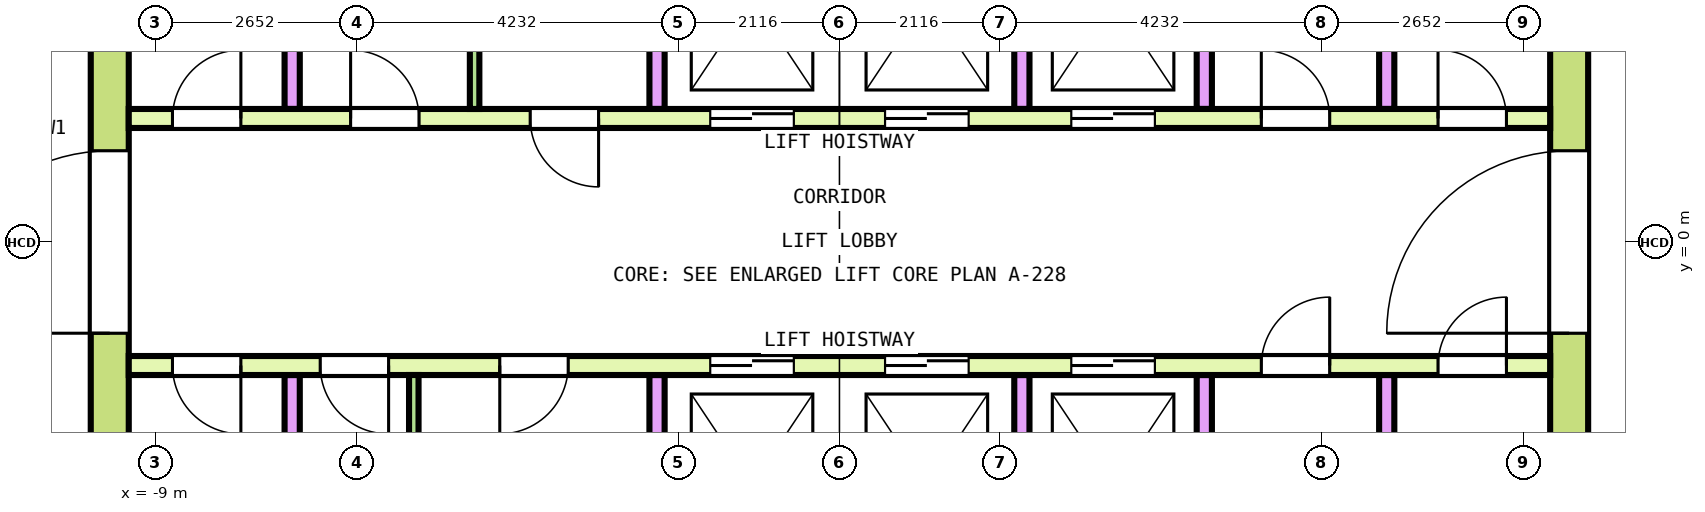
"""IFC4 building model, lengths in metres.
Left out: names, types, materials, properties, quantities, classifications, styles, units other than length and angle.
Written with IfcOpenShell. Run it as: python <this file> out.ifc"""

import sys

from ifc_helpers import new_model, si_unit, direction, frame, frame_2d, origin, place, context, subcontext, project, spatial, rectangle, extrude, element, fill, save


model = new_model("IFC4")
c1 = context("Model", 3, precision=1e-05, world=origin(), true_north=direction((0.0, 1.0)))
c2 = subcontext(c1, "Body", "Model", "MODEL_VIEW")
j1 = project(units=[si_unit("LENGTHUNIT", "METRE"), si_unit("PLANEANGLEUNIT", "RADIAN")], contexts=[c1])
p1 = place(None, origin())
s1 = spatial("IfcSite", under=j1, at=p1, CompositionType="ELEMENT")
p2 = place(p1, origin())
s2 = spatial("IfcBuilding", under=s1, at=p2, CompositionType="ELEMENT")
p3 = place(p2, frame((0.0, 0.0, 263.0)))
s3 = spatial("IfcBuildingStorey", under=s2, at=p3, CompositionType="ELEMENT", Elevation=263.0)
p4 = place(p3, frame((-9.6, -7.85, 0.0), z_axis=(0.0, 0.0, 1.0), x_axis=(0.0, 1.0, 0.0)))
e1 = element("IfcWall", 1, at=p4, inside=s3, PredefinedType="SHEAR", context=c2, shape_type="SweptSolid", body=[
    extrude(rectangle(XDim=15.7, YDim=0.5, at=frame_2d((7.85, 0.0))), origin(), (0.0, 0.0, 1.0), 3.7),
])
p5 = place(p4, frame((6.65, 0.0, 0.0)))
e2 = element("IfcOpeningElement", 2, at=p5, cuts=e1, PredefinedType="OPENING", context=c2, shape_type="SweptSolid", body=[
    extrude(rectangle(XDim=2.4, YDim=2.1, at=frame_2d((1.2, 1.05))), frame((0.0, 0.26, 0.0), z_axis=(0.0, -1.0, 0.0), x_axis=(1.0, 0.0, 0.0)), (0.0, 0.0, 1.0), 0.52),
])
p6 = place(p4, frame((13.55, 0.0, 0.0)))
e3 = element("IfcOpeningElement", 3, at=p6, cuts=e1, PredefinedType="OPENING", context=c2, shape_type="SweptSolid", body=[
    extrude(rectangle(XDim=1.2, YDim=2.1, at=frame_2d((0.6, 1.05))), frame((0.0, 0.26, 0.0), z_axis=(0.0, -1.0, 0.0), x_axis=(1.0, 0.0, 0.0)), (0.0, 0.0, 1.0), 0.52),
])
p7 = place(p4, frame((0.95, 0.0, 0.0)))
e4 = element("IfcOpeningElement", 4, at=p7, cuts=e1, PredefinedType="OPENING", context=c2, shape_type="SweptSolid", body=[
    extrude(rectangle(XDim=1.2, YDim=2.1, at=frame_2d((0.6, 1.05))), frame((0.0, 0.26, 0.0), z_axis=(0.0, -1.0, 0.0), x_axis=(1.0, 0.0, 0.0)), (0.0, 0.0, 1.0), 0.52),
])
p8 = place(p3, frame((9.6, -7.85, 0.0), z_axis=(0.0, 0.0, 1.0), x_axis=(0.0, 1.0, 0.0)))
e5 = element("IfcWall", 5, at=p8, inside=s3, PredefinedType="SHEAR", context=c2, shape_type="SweptSolid", body=[
    extrude(rectangle(XDim=15.7, YDim=0.5, at=frame_2d((7.85, 0.0))), origin(), (0.0, 0.0, 1.0), 3.7),
])
p9 = place(p8, frame((6.65, 0.0, 0.0)))
e6 = element("IfcOpeningElement", 6, at=p9, cuts=e5, PredefinedType="OPENING", context=c2, shape_type="SweptSolid", body=[
    extrude(rectangle(XDim=2.4, YDim=2.1, at=frame_2d((1.2, 1.05))), frame((0.0, 0.26, 0.0), z_axis=(0.0, -1.0, 0.0), x_axis=(1.0, 0.0, 0.0)), (0.0, 0.0, 1.0), 0.52),
])
p10 = place(p8, frame((13.55, 0.0, 0.0)))
e7 = element("IfcOpeningElement", 7, at=p10, cuts=e5, PredefinedType="OPENING", context=c2, shape_type="SweptSolid", body=[
    extrude(rectangle(XDim=1.2, YDim=2.1, at=frame_2d((0.6, 1.05))), frame((0.0, 0.26, 0.0), z_axis=(0.0, -1.0, 0.0), x_axis=(1.0, 0.0, 0.0)), (0.0, 0.0, 1.0), 0.52),
])
p11 = place(p8, frame((1.05, 0.0, 0.0)))
e8 = element("IfcOpeningElement", 8, at=p11, cuts=e5, PredefinedType="OPENING", context=c2, shape_type="SweptSolid", body=[
    extrude(rectangle(XDim=1.0, YDim=2.1, at=frame_2d((0.5, 1.05))), frame((0.0, 0.26, 0.0), z_axis=(0.0, -1.0, 0.0), x_axis=(1.0, 0.0, 0.0)), (0.0, 0.0, 1.0), 0.52),
])
p12 = place(p3, frame((-9.35, 1.625, 0.0), z_axis=(0.0, 0.0, 1.0), x_axis=(1.0, 0.0, 0.0)))
e9 = element("IfcWall", 9, at=p12, inside=s3, PredefinedType="SOLIDWALL", context=c2, shape_type="SweptSolid", body=[
    extrude(rectangle(XDim=18.7, YDim=0.25, at=frame_2d((9.35, 0.0))), origin(), (0.0, 0.0, 1.0), 3.7),
])
p13 = place(p12, frame((7.65, 0.0, 0.0)))
e10 = element("IfcOpeningElement", 10, at=p13, cuts=e9, PredefinedType="OPENING", context=c2, shape_type="SweptSolid", body=[
    extrude(rectangle(XDim=1.1, YDim=2.1, at=frame_2d((0.55, 1.05))), frame((0.0, 0.135, 0.0), z_axis=(0.0, -1.0, 0.0), x_axis=(1.0, 0.0, 0.0)), (0.0, 0.0, 1.0), 0.27),
])
p14 = place(p12, frame((9.95, 0.0, 0.0)))
e11 = element("IfcOpeningElement", 11, at=p14, cuts=e9, PredefinedType="OPENING", context=c2, shape_type="SweptSolid", body=[
    extrude(rectangle(XDim=1.1, YDim=2.1, at=frame_2d((0.55, 1.05))), frame((0.0, 0.135, 0.0), z_axis=(0.0, -1.0, 0.0), x_axis=(1.0, 0.0, 0.0)), (0.0, 0.0, 1.0), 0.27),
])
p15 = place(p12, frame((12.4, 0.0, 0.0)))
e12 = element("IfcOpeningElement", 12, at=p15, cuts=e9, PredefinedType="OPENING", context=c2, shape_type="SweptSolid", body=[
    extrude(rectangle(XDim=1.1, YDim=2.1, at=frame_2d((0.55, 1.05))), frame((0.0, 0.135, 0.0), z_axis=(0.0, -1.0, 0.0), x_axis=(1.0, 0.0, 0.0)), (0.0, 0.0, 1.0), 0.27),
])
p16 = place(p12, frame((0.575, 0.0, 0.0)))
e13 = element("IfcOpeningElement", 13, at=p16, cuts=e9, PredefinedType="OPENING", context=c2, shape_type="SweptSolid", body=[
    extrude(rectangle(XDim=0.9, YDim=2.1, at=frame_2d((0.45, 1.05))), frame((0.0, 0.135, 0.0), z_axis=(0.0, -1.0, 0.0), x_axis=(1.0, 0.0, 0.0)), (0.0, 0.0, 1.0), 0.27),
])
p17 = place(p12, frame((2.919, 0.0, 0.0)))
e14 = element("IfcOpeningElement", 14, at=p17, cuts=e9, PredefinedType="OPENING", context=c2, shape_type="SweptSolid", body=[
    extrude(rectangle(XDim=0.9, YDim=2.1, at=frame_2d((0.45, 1.05))), frame((0.0, 0.135, 0.0), z_axis=(0.0, -1.0, 0.0), x_axis=(1.0, 0.0, 0.0)), (0.0, 0.0, 1.0), 0.27),
])
p18 = place(p12, frame((5.281, 0.0, 0.0)))
e15 = element("IfcOpeningElement", 15, at=p18, cuts=e9, PredefinedType="OPENING", context=c2, shape_type="SweptSolid", body=[
    extrude(rectangle(XDim=0.9, YDim=2.1, at=frame_2d((0.45, 1.05))), frame((0.0, 0.135, 0.0), z_axis=(0.0, -1.0, 0.0), x_axis=(1.0, 0.0, 0.0)), (0.0, 0.0, 1.0), 0.27),
])
p19 = place(p12, frame((14.9, 0.0, 0.0)))
e16 = element("IfcOpeningElement", 16, at=p19, cuts=e9, PredefinedType="OPENING", context=c2, shape_type="SweptSolid", body=[
    extrude(rectangle(XDim=0.9, YDim=2.1, at=frame_2d((0.45, 1.05))), frame((0.0, 0.135, 0.0), z_axis=(0.0, -1.0, 0.0), x_axis=(1.0, 0.0, 0.0)), (0.0, 0.0, 1.0), 0.27),
])
p20 = place(p12, frame((17.225, 0.0, 0.0)))
e17 = element("IfcOpeningElement", 17, at=p20, cuts=e9, PredefinedType="OPENING", context=c2, shape_type="SweptSolid", body=[
    extrude(rectangle(XDim=0.9, YDim=2.1, at=frame_2d((0.45, 1.05))), frame((0.0, 0.135, 0.0), z_axis=(0.0, -1.0, 0.0), x_axis=(1.0, 0.0, 0.0)), (0.0, 0.0, 1.0), 0.27),
])
for number, where, z_axis, x_axis in (
    (18, (-7.2, 1.75, 0.0), (0.0, 0.0, 1.0), (0.0, 1.0, 0.0)),
    (19, (-2.4, 1.75, 0.0), (0.0, 0.0, 1.0), (0.0, 1.0, 0.0)),
    (20, (2.4, 1.75, 0.0), (0.0, 0.0, 1.0), (0.0, 1.0, 0.0)),
    (21, (4.8, 1.75, 0.0), (0.0, 0.0, 1.0), (0.0, 1.0, 0.0)),
    (22, (7.2, 1.75, 0.0), (0.0, 0.0, 1.0), (0.0, 1.0, 0.0)),
):
    element("IfcWall", number, at=place(p3, frame(where, z_axis=z_axis, x_axis=x_axis)), inside=s3, PredefinedType="SOLIDWALL", context=c2, shape_type="SweptSolid", body=[
        extrude(rectangle(XDim=2.9, YDim=0.2, at=frame_2d((1.45, 0.0))), origin(), (0.0, 0.0, 1.0), 3.7),
    ])
p21 = place(p3, frame((-9.35, -1.625, 0.0), z_axis=(0.0, 0.0, 1.0), x_axis=(1.0, 0.0, 0.0)))
e23 = element("IfcWall", 23, at=p21, inside=s3, PredefinedType="SOLIDWALL", context=c2, shape_type="SweptSolid", body=[
    extrude(rectangle(XDim=18.7, YDim=0.25, at=frame_2d((9.35, 0.0))), origin(), (0.0, 0.0, 1.0), 3.7),
])
p22 = place(p21, frame((7.65, 0.0, 0.0)))
e24 = element("IfcOpeningElement", 24, at=p22, cuts=e23, PredefinedType="OPENING", context=c2, shape_type="SweptSolid", body=[
    extrude(rectangle(XDim=1.1, YDim=2.1, at=frame_2d((0.55, 1.05))), frame((0.0, 0.135, 0.0), z_axis=(0.0, -1.0, 0.0), x_axis=(1.0, 0.0, 0.0)), (0.0, 0.0, 1.0), 0.27),
])
p23 = place(p21, frame((9.95, 0.0, 0.0)))
e25 = element("IfcOpeningElement", 25, at=p23, cuts=e23, PredefinedType="OPENING", context=c2, shape_type="SweptSolid", body=[
    extrude(rectangle(XDim=1.1, YDim=2.1, at=frame_2d((0.55, 1.05))), frame((0.0, 0.135, 0.0), z_axis=(0.0, -1.0, 0.0), x_axis=(1.0, 0.0, 0.0)), (0.0, 0.0, 1.0), 0.27),
])
p24 = place(p21, frame((12.4, 0.0, 0.0)))
e26 = element("IfcOpeningElement", 26, at=p24, cuts=e23, PredefinedType="OPENING", context=c2, shape_type="SweptSolid", body=[
    extrude(rectangle(XDim=1.1, YDim=2.1, at=frame_2d((0.55, 1.05))), frame((0.0, 0.135, 0.0), z_axis=(0.0, -1.0, 0.0), x_axis=(1.0, 0.0, 0.0)), (0.0, 0.0, 1.0), 0.27),
])
p25 = place(p21, frame((0.575, 0.0, 0.0)))
e27 = element("IfcOpeningElement", 27, at=p25, cuts=e23, PredefinedType="OPENING", context=c2, shape_type="SweptSolid", body=[
    extrude(rectangle(XDim=0.9, YDim=2.1, at=frame_2d((0.45, 1.05))), frame((0.0, 0.135, 0.0), z_axis=(0.0, -1.0, 0.0), x_axis=(1.0, 0.0, 0.0)), (0.0, 0.0, 1.0), 0.27),
])
p26 = place(p21, frame((2.519, 0.0, 0.0)))
e28 = element("IfcOpeningElement", 28, at=p26, cuts=e23, PredefinedType="OPENING", context=c2, shape_type="SweptSolid", body=[
    extrude(rectangle(XDim=0.9, YDim=2.1, at=frame_2d((0.45, 1.05))), frame((0.0, 0.135, 0.0), z_axis=(0.0, -1.0, 0.0), x_axis=(1.0, 0.0, 0.0)), (0.0, 0.0, 1.0), 0.27),
])
p27 = place(p21, frame((4.881, 0.0, 0.0)))
e29 = element("IfcOpeningElement", 29, at=p27, cuts=e23, PredefinedType="OPENING", context=c2, shape_type="SweptSolid", body=[
    extrude(rectangle(XDim=0.9, YDim=2.1, at=frame_2d((0.45, 1.05))), frame((0.0, 0.135, 0.0), z_axis=(0.0, -1.0, 0.0), x_axis=(1.0, 0.0, 0.0)), (0.0, 0.0, 1.0), 0.27),
])
p28 = place(p21, frame((14.9, 0.0, 0.0)))
e30 = element("IfcOpeningElement", 30, at=p28, cuts=e23, PredefinedType="OPENING", context=c2, shape_type="SweptSolid", body=[
    extrude(rectangle(XDim=0.9, YDim=2.1, at=frame_2d((0.45, 1.05))), frame((0.0, 0.135, 0.0), z_axis=(0.0, -1.0, 0.0), x_axis=(1.0, 0.0, 0.0)), (0.0, 0.0, 1.0), 0.27),
])
p29 = place(p21, frame((17.225, 0.0, 0.0)))
e31 = element("IfcOpeningElement", 31, at=p29, cuts=e23, PredefinedType="OPENING", context=c2, shape_type="SweptSolid", body=[
    extrude(rectangle(XDim=0.9, YDim=2.1, at=frame_2d((0.45, 1.05))), frame((0.0, 0.135, 0.0), z_axis=(0.0, -1.0, 0.0), x_axis=(1.0, 0.0, 0.0)), (0.0, 0.0, 1.0), 0.27),
])
for number, where, z_axis, x_axis in (
    (32, (-7.2, -4.65, 0.0), (0.0, 0.0, 1.0), (0.0, 1.0, 0.0)),
    (33, (-2.4, -4.65, 0.0), (0.0, 0.0, 1.0), (0.0, 1.0, 0.0)),
    (34, (2.4, -4.65, 0.0), (0.0, 0.0, 1.0), (0.0, 1.0, 0.0)),
    (35, (4.8, -4.65, 0.0), (0.0, 0.0, 1.0), (0.0, 1.0, 0.0)),
    (36, (7.2, -4.65, 0.0), (0.0, 0.0, 1.0), (0.0, 1.0, 0.0)),
):
    element("IfcWall", number, at=place(p3, frame(where, z_axis=z_axis, x_axis=x_axis)), inside=s3, PredefinedType="SOLIDWALL", context=c2, shape_type="SweptSolid", body=[
        extrude(rectangle(XDim=2.9, YDim=0.2, at=frame_2d((1.45, 0.0))), origin(), (0.0, 0.0, 1.0), 3.7),
    ])
for number, where, z_axis, x_axis in (
    (37, (-4.8, 1.75, 0.0), (0.0, 0.0, 1.0), (0.0, 1.0, 0.0)),
    (38, (-5.6, -4.65, 0.0), (0.0, 0.0, 1.0), (0.0, 1.0, 0.0)),
):
    element("IfcWall", number, at=place(p3, frame(where, z_axis=z_axis, x_axis=x_axis)), inside=s3, PredefinedType="PARTITIONING", context=c2, shape_type="SweptSolid", body=[
        extrude(rectangle(XDim=2.9, YDim=0.125, at=frame_2d((1.45, 0.0))), origin(), (0.0, 0.0, 1.0), 3.7),
    ])
p30 = place(p13, origin())
e39 = element("IfcDoor", 39, at=p30, inside=s3, OperationType="DOUBLE_DOOR_SLIDING", PredefinedType="DOOR", context=c2, shape_type="SweptSolid", body=[
    extrude(rectangle(XDim=1.1, YDim=2.1, at=frame_2d((0.55, 1.05))), frame((0.0, 0.075, 0.0), z_axis=(0.0, -1.0, 0.0), x_axis=(1.0, 0.0, 0.0)), (0.0, 0.0, 1.0), 0.15),
])
fill(e10, e39)
p31 = place(p14, origin())
e40 = element("IfcDoor", 40, at=p31, inside=s3, OperationType="DOUBLE_DOOR_SLIDING", PredefinedType="DOOR", context=c2, shape_type="SweptSolid", body=[
    extrude(rectangle(XDim=1.1, YDim=2.1, at=frame_2d((0.55, 1.05))), frame((0.0, 0.075, 0.0), z_axis=(0.0, -1.0, 0.0), x_axis=(1.0, 0.0, 0.0)), (0.0, 0.0, 1.0), 0.15),
])
fill(e11, e40)
p32 = place(p15, origin())
e41 = element("IfcDoor", 41, at=p32, inside=s3, OperationType="DOUBLE_DOOR_SLIDING", PredefinedType="DOOR", context=c2, shape_type="SweptSolid", body=[
    extrude(rectangle(XDim=1.1, YDim=2.1, at=frame_2d((0.55, 1.05))), frame((0.0, 0.075, 0.0), z_axis=(0.0, -1.0, 0.0), x_axis=(1.0, 0.0, 0.0)), (0.0, 0.0, 1.0), 0.15),
])
fill(e12, e41)
p33 = place(p22, origin())
e42 = element("IfcDoor", 42, at=p33, inside=s3, OperationType="DOUBLE_DOOR_SLIDING", PredefinedType="DOOR", context=c2, shape_type="SweptSolid", body=[
    extrude(rectangle(XDim=1.1, YDim=2.1, at=frame_2d((0.55, 1.05))), frame((0.0, 0.075, 0.0), z_axis=(0.0, -1.0, 0.0), x_axis=(1.0, 0.0, 0.0)), (0.0, 0.0, 1.0), 0.15),
])
fill(e24, e42)
p34 = place(p23, origin())
e43 = element("IfcDoor", 43, at=p34, inside=s3, OperationType="DOUBLE_DOOR_SLIDING", PredefinedType="DOOR", context=c2, shape_type="SweptSolid", body=[
    extrude(rectangle(XDim=1.1, YDim=2.1, at=frame_2d((0.55, 1.05))), frame((0.0, 0.075, 0.0), z_axis=(0.0, -1.0, 0.0), x_axis=(1.0, 0.0, 0.0)), (0.0, 0.0, 1.0), 0.15),
])
fill(e25, e43)
p35 = place(p24, origin())
e44 = element("IfcDoor", 44, at=p35, inside=s3, OperationType="DOUBLE_DOOR_SLIDING", PredefinedType="DOOR", context=c2, shape_type="SweptSolid", body=[
    extrude(rectangle(XDim=1.1, YDim=2.1, at=frame_2d((0.55, 1.05))), frame((0.0, 0.075, 0.0), z_axis=(0.0, -1.0, 0.0), x_axis=(1.0, 0.0, 0.0)), (0.0, 0.0, 1.0), 0.15),
])
fill(e26, e44)
p36 = place(p5, origin())
e45 = element("IfcDoor", 45, at=p36, inside=s3, OperationType="DOUBLE_DOOR_SINGLE_SWING", PredefinedType="DOOR", context=c2, shape_type="SweptSolid", body=[
    extrude(rectangle(XDim=2.4, YDim=2.1, at=frame_2d((1.2, 1.05))), frame((0.0, 0.2, 0.0), z_axis=(0.0, -1.0, 0.0), x_axis=(1.0, 0.0, 0.0)), (0.0, 0.0, 1.0), 0.4),
])
fill(e2, e45)
p37 = place(p9, origin())
e46 = element("IfcDoor", 46, at=p37, inside=s3, OperationType="DOUBLE_DOOR_SINGLE_SWING", PredefinedType="DOOR", context=c2, shape_type="SweptSolid", body=[
    extrude(rectangle(XDim=2.4, YDim=2.1, at=frame_2d((1.2, 1.05))), frame((0.0, 0.2, 0.0), z_axis=(0.0, -1.0, 0.0), x_axis=(1.0, 0.0, 0.0)), (0.0, 0.0, 1.0), 0.4),
])
fill(e6, e46)
p38 = place(p16, origin())
e47 = element("IfcDoor", 47, at=p38, inside=s3, OperationType="SINGLE_SWING_RIGHT", PredefinedType="DOOR", context=c2, shape_type="SweptSolid", body=[
    extrude(rectangle(XDim=0.9, YDim=2.1, at=frame_2d((0.45, 1.05))), frame((0.0, 0.075, 0.0), z_axis=(0.0, -1.0, 0.0), x_axis=(1.0, 0.0, 0.0)), (0.0, 0.0, 1.0), 0.15),
])
fill(e13, e47)
p39 = place(p17, origin())
e48 = element("IfcDoor", 48, at=p39, inside=s3, OperationType="SINGLE_SWING_LEFT", PredefinedType="DOOR", context=c2, shape_type="SweptSolid", body=[
    extrude(rectangle(XDim=0.9, YDim=2.1, at=frame_2d((0.45, 1.05))), frame((0.0, 0.075, 0.0), z_axis=(0.0, -1.0, 0.0), x_axis=(1.0, 0.0, 0.0)), (0.0, 0.0, 1.0), 0.15),
])
fill(e14, e48)
p40 = place(p18, origin())
e49 = element("IfcDoor", 49, at=p40, inside=s3, OperationType="SINGLE_SWING_RIGHT", PredefinedType="DOOR", context=c2, shape_type="SweptSolid", body=[
    extrude(rectangle(XDim=0.9, YDim=2.1, at=frame_2d((0.45, 1.05))), frame((0.0, 0.075, 0.0), z_axis=(0.0, -1.0, 0.0), x_axis=(1.0, 0.0, 0.0)), (0.0, 0.0, 1.0), 0.15),
])
fill(e15, e49)
p41 = place(p19, origin())
e50 = element("IfcDoor", 50, at=p41, inside=s3, OperationType="SINGLE_SWING_LEFT", PredefinedType="DOOR", context=c2, shape_type="SweptSolid", body=[
    extrude(rectangle(XDim=0.9, YDim=2.1, at=frame_2d((0.45, 1.05))), frame((0.0, 0.075, 0.0), z_axis=(0.0, -1.0, 0.0), x_axis=(1.0, 0.0, 0.0)), (0.0, 0.0, 1.0), 0.15),
])
fill(e16, e50)
p42 = place(p20, origin())
e51 = element("IfcDoor", 51, at=p42, inside=s3, OperationType="SINGLE_SWING_RIGHT", PredefinedType="DOOR", context=c2, shape_type="SweptSolid", body=[
    extrude(rectangle(XDim=0.9, YDim=2.1, at=frame_2d((0.45, 1.05))), frame((0.0, 0.075, 0.0), z_axis=(0.0, -1.0, 0.0), x_axis=(1.0, 0.0, 0.0)), (0.0, 0.0, 1.0), 0.15),
])
fill(e17, e51)
p43 = place(p25, origin())
e52 = element("IfcDoor", 52, at=p43, inside=s3, OperationType="SINGLE_SWING_LEFT", PredefinedType="DOOR", context=c2, shape_type="SweptSolid", body=[
    extrude(rectangle(XDim=0.9, YDim=2.1, at=frame_2d((0.45, 1.05))), frame((0.0, 0.075, 0.0), z_axis=(0.0, -1.0, 0.0), x_axis=(1.0, 0.0, 0.0)), (0.0, 0.0, 1.0), 0.15),
])
fill(e27, e52)
p44 = place(p26, origin())
e53 = element("IfcDoor", 53, at=p44, inside=s3, OperationType="SINGLE_SWING_RIGHT", PredefinedType="DOOR", context=c2, shape_type="SweptSolid", body=[
    extrude(rectangle(XDim=0.9, YDim=2.1, at=frame_2d((0.45, 1.05))), frame((0.0, 0.075, 0.0), z_axis=(0.0, -1.0, 0.0), x_axis=(1.0, 0.0, 0.0)), (0.0, 0.0, 1.0), 0.15),
])
fill(e28, e53)
p45 = place(p27, origin())
e54 = element("IfcDoor", 54, at=p45, inside=s3, OperationType="SINGLE_SWING_LEFT", PredefinedType="DOOR", context=c2, shape_type="SweptSolid", body=[
    extrude(rectangle(XDim=0.9, YDim=2.1, at=frame_2d((0.45, 1.05))), frame((0.0, 0.075, 0.0), z_axis=(0.0, -1.0, 0.0), x_axis=(1.0, 0.0, 0.0)), (0.0, 0.0, 1.0), 0.15),
])
fill(e29, e54)
p46 = place(p28, origin())
e55 = element("IfcDoor", 55, at=p46, inside=s3, OperationType="SINGLE_SWING_RIGHT", PredefinedType="DOOR", context=c2, shape_type="SweptSolid", body=[
    extrude(rectangle(XDim=0.9, YDim=2.1, at=frame_2d((0.45, 1.05))), frame((0.0, 0.075, 0.0), z_axis=(0.0, -1.0, 0.0), x_axis=(1.0, 0.0, 0.0)), (0.0, 0.0, 1.0), 0.15),
])
fill(e30, e55)
p47 = place(p29, origin())
e56 = element("IfcDoor", 56, at=p47, inside=s3, OperationType="SINGLE_SWING_LEFT", PredefinedType="DOOR", context=c2, shape_type="SweptSolid", body=[
    extrude(rectangle(XDim=0.9, YDim=2.1, at=frame_2d((0.45, 1.05))), frame((0.0, 0.075, 0.0), z_axis=(0.0, -1.0, 0.0), x_axis=(1.0, 0.0, 0.0)), (0.0, 0.0, 1.0), 0.15),
])
fill(e31, e56)
save(model, sys.argv[1])
